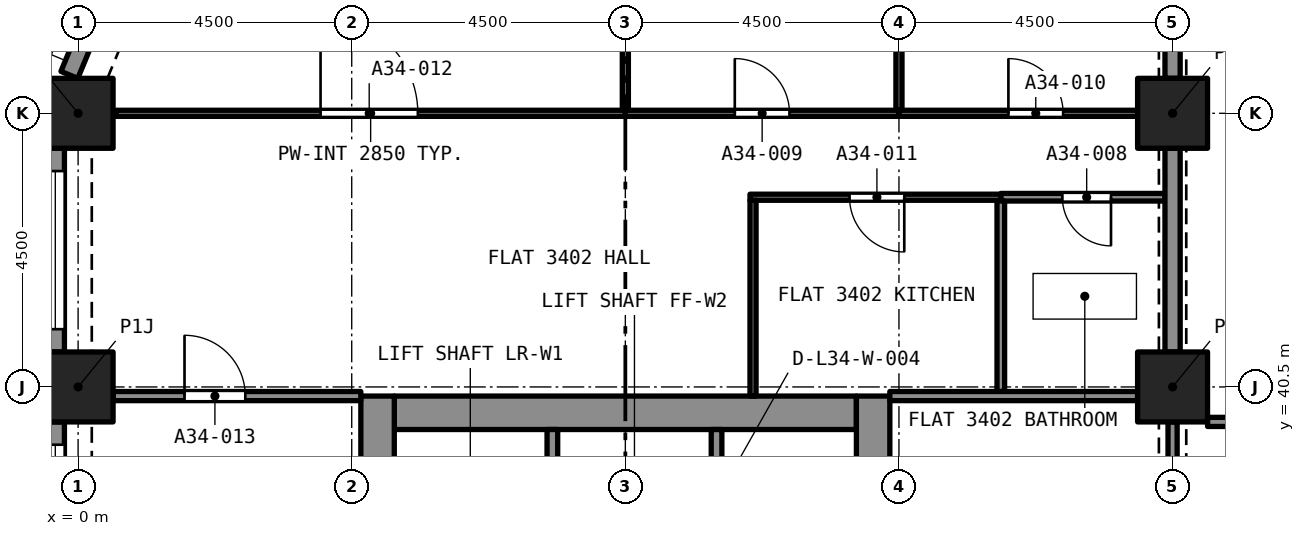
"""IFC4 building model, lengths in metres.
Left out: names, types, materials, properties, quantities, classifications, styles, units other than length and angle.
Written with IfcOpenShell. Run it as: python <this file> out.ifc"""

import sys

from ifc_helpers import new_model, si_unit, direction, frame, frame_2d, origin, origin_2d, place, context, subcontext, project, spatial, rectangle, extrude, element, fill, save


model = new_model("IFC4")
c1 = context("Model", 3, precision=1e-05, world=origin(), true_north=direction((0.0, 1.0)))
c2 = subcontext(c1, "Body", "Model", "MODEL_VIEW")
j1 = project(units=[si_unit("LENGTHUNIT", "METRE"), si_unit("PLANEANGLEUNIT", "RADIAN")], contexts=[c1])
p1 = place(None, origin())
s1 = spatial("IfcSite", under=j1, at=p1, CompositionType="ELEMENT")
p2 = place(p1, origin())
s2 = spatial("IfcBuilding", under=s1, at=p2, CompositionType="ELEMENT")
p3 = place(p2, frame((0.0, 0.0, 121.6)))
s3 = spatial("IfcBuildingStorey", under=s2, at=p3, CompositionType="ELEMENT", Elevation=121.6)
for number, where, z_axis, x_axis in (
    (1, (0.0, 40.5, 0.0), (0.0, 0.0, 1.0), (1.0, 0.0, 0.0)),
    (2, (18.0, 40.5, 0.0), (0.0, 0.0, 1.0), (1.0, 0.0, 0.0)),
    (3, (0.0, 45.0, 0.0), (0.0, 0.0, 1.0), (1.0, 0.0, 0.0)),
    (4, (18.0, 45.0, 0.0), (0.0, 0.0, 1.0), (1.0, 0.0, 0.0)),
):
    element("IfcColumn", number, at=place(p3, frame(where, z_axis=z_axis, x_axis=x_axis)), inside=s3, PredefinedType="COLUMN", context=c2, shape_type="SweptSolid", body=[
        extrude(rectangle(XDim=1.15, YDim=1.15, at=origin_2d()), origin(), (0.0, 0.0, 1.0), 3.2),
    ])
p4 = place(p3, frame((5.2, 40.075, 0.0), z_axis=(0.0, 0.0, 1.0), x_axis=(1.0, 0.0, 0.0)))
e5 = element("IfcWall", 5, at=p4, inside=s3, PredefinedType="SOLIDWALL", context=c2, shape_type="SweptSolid", body=[
    extrude(rectangle(XDim=7.6, YDim=0.55, at=frame_2d((3.8, 0.0))), origin(), (0.0, 0.0, 1.0), 3.2),
])
p5 = place(p3, frame((4.925, 27.15, 0.0), z_axis=(0.0, 0.0, 1.0), x_axis=(0.0, 1.0, 0.0)))
e6 = element("IfcWall", 6, at=p5, inside=s3, PredefinedType="SOLIDWALL", context=c2, shape_type="SweptSolid", body=[
    extrude(rectangle(XDim=13.2, YDim=0.55, at=frame_2d((6.6, 0.0))), origin(), (0.0, 0.0, 1.0), 3.2),
])
p6 = place(p5, frame((8.8, 0.0, 0.0)))
e7 = element("IfcOpeningElement", 7, at=p6, cuts=e6, PredefinedType="OPENING", context=c2, shape_type="SweptSolid", body=[
    extrude(rectangle(XDim=1.2, YDim=2.1, at=frame_2d((0.6, 1.05))), frame((0.0, 0.285, 0.0), z_axis=(0.0, -1.0, 0.0), x_axis=(1.0, 0.0, 0.0)), (0.0, 0.0, 1.0), 0.57),
])
p7 = place(p3, frame((13.075, 27.15, 0.0), z_axis=(0.0, 0.0, 1.0), x_axis=(0.0, 1.0, 0.0)))
e8 = element("IfcWall", 8, at=p7, inside=s3, PredefinedType="SOLIDWALL", context=c2, shape_type="SweptSolid", body=[
    extrude(rectangle(XDim=13.2, YDim=0.55, at=frame_2d((6.6, 0.0))), origin(), (0.0, 0.0, 1.0), 3.2),
])
p8 = place(p7, frame((10.95, 0.0, 0.0)))
e9 = element("IfcOpeningElement", 9, at=p8, cuts=e8, PredefinedType="OPENING", context=c2, shape_type="SweptSolid", body=[
    extrude(rectangle(XDim=1.1, YDim=2.1, at=frame_2d((0.55, 1.05))), frame((0.0, 0.285, 0.0), z_axis=(0.0, -1.0, 0.0), x_axis=(1.0, 0.0, 0.0)), (0.0, 0.0, 1.0), 0.57),
])
p9 = place(p7, frame((8.8, 0.0, 0.0)))
e10 = element("IfcOpeningElement", 10, at=p9, cuts=e8, PredefinedType="OPENING", context=c2, shape_type="SweptSolid", body=[
    extrude(rectangle(XDim=1.2, YDim=2.1, at=frame_2d((0.6, 1.05))), frame((0.0, 0.285, 0.0), z_axis=(0.0, -1.0, 0.0), x_axis=(1.0, 0.0, 0.0)), (0.0, 0.0, 1.0), 0.57),
])
p10 = place(p3, frame((-0.144, 45.632, 0.0), z_axis=(0.0, 0.0, 1.0), x_axis=(0.382723818695, 0.923862802911, 0.0)))
e11 = element("IfcWall", 11, at=p10, inside=s3, PredefinedType="SOLIDWALL", context=c2, shape_type="SweptSolid", body=[
    extrude(rectangle(XDim=2.164, YDim=0.3, at=frame_2d((1.082, 0.0))), origin(), (0.0, 0.0, 1.0), 3.2),
])
p11 = place(p10, frame((0.493, 0.0, 0.45)))
e12 = element("IfcOpeningElement", 12, at=p11, cuts=e11, PredefinedType="OPENING", context=c2, shape_type="SweptSolid", body=[
    extrude(rectangle(XDim=1.4, YDim=1.95, at=frame_2d((0.7, 0.975))), frame((0.0, 0.16, 0.0), z_axis=(0.0, -1.0, 0.0), x_axis=(1.0, 0.0, 0.0)), (0.0, 0.0, 1.0), 0.32),
])
p12 = place(p3, frame((-0.375, 41.075, 0.0), z_axis=(0.0, 0.0, 1.0), x_axis=(0.0, 1.0, 0.0)))
e13 = element("IfcWall", 13, at=p12, inside=s3, PredefinedType="SOLIDWALL", context=c2, shape_type="SweptSolid", body=[
    extrude(rectangle(XDim=3.35, YDim=0.3, at=frame_2d((1.675, 0.0))), origin(), (0.0, 0.0, 1.0), 3.2),
])
p13 = place(p12, frame((0.375, 0.0, 0.45)))
e14 = element("IfcOpeningElement", 14, at=p13, cuts=e13, PredefinedType="OPENING", context=c2, shape_type="SweptSolid", body=[
    extrude(rectangle(XDim=2.6, YDim=1.95, at=frame_2d((1.3, 0.975))), frame((0.0, 0.16, 0.0), z_axis=(0.0, -1.0, 0.0), x_axis=(1.0, 0.0, 0.0)), (0.0, 0.0, 1.0), 0.32),
])
p14 = place(p3, frame((-0.375, 36.575, 0.0), z_axis=(0.0, 0.0, 1.0), x_axis=(0.0, 1.0, 0.0)))
e15 = element("IfcWall", 15, at=p14, inside=s3, PredefinedType="SOLIDWALL", context=c2, shape_type="SweptSolid", body=[
    extrude(rectangle(XDim=3.35, YDim=0.3, at=frame_2d((1.675, 0.0))), origin(), (0.0, 0.0, 1.0), 3.2),
])
p15 = place(p14, frame((0.375, 0.0, 0.45)))
e16 = element("IfcOpeningElement", 16, at=p15, cuts=e15, PredefinedType="OPENING", context=c2, shape_type="SweptSolid", body=[
    extrude(rectangle(XDim=2.6, YDim=1.95, at=frame_2d((1.3, 0.975))), frame((0.0, 0.16, 0.0), z_axis=(0.0, -1.0, 0.0), x_axis=(1.0, 0.0, 0.0)), (0.0, 0.0, 1.0), 0.32),
])
p16 = place(p3, frame((17.875, 43.62, 0.0), z_axis=(0.0, 0.0, 1.0), x_axis=(-1.0, 0.0, 0.0)))
e17 = element("IfcWall", 17, at=p16, inside=s3, PredefinedType="PARTITIONING", context=c2, shape_type="SweptSolid", body=[
    extrude(rectangle(XDim=2.7, YDim=0.125, at=frame_2d((1.35, 0.0))), origin(), (0.0, 0.0, 1.0), 2.85),
])
p17 = place(p16, frame((0.888, 0.0, 0.0)))
e18 = element("IfcOpeningElement", 18, at=p17, cuts=e17, PredefinedType="OPENING", context=c2, shape_type="SweptSolid", body=[
    extrude(rectangle(XDim=0.8, YDim=2.1, at=frame_2d((0.4, 1.05))), frame((0.0, 0.073, 0.0), z_axis=(0.0, -1.0, 0.0), x_axis=(1.0, 0.0, 0.0)), (0.0, 0.0, 1.0), 0.145),
])
p18 = place(p3, frame((15.175, 40.425, 0.0), z_axis=(0.0, 0.0, 1.0), x_axis=(0.0, 1.0, 0.0)))
e19 = element("IfcWall", 19, at=p18, inside=s3, PredefinedType="PARTITIONING", context=c2, shape_type="SweptSolid", body=[
    extrude(rectangle(XDim=3.133, YDim=0.125, at=frame_2d((1.566, 0.0))), origin(), (0.0, 0.0, 1.0), 2.85),
])
p19 = place(p3, frame((18.0, 41.075, 0.0), z_axis=(0.0, 0.0, 1.0), x_axis=(0.0, 1.0, 0.0)))
e20 = element("IfcWall", 20, at=p19, inside=s3, PredefinedType="PARTITIONING", context=c2, shape_type="SweptSolid", body=[
    extrude(rectangle(XDim=3.35, YDim=0.25, at=frame_2d((1.675, 0.0))), origin(), (0.0, 0.0, 1.0), 2.38),
])
p20 = place(p3, frame((13.5, 45.05, 0.0), z_axis=(0.0, 0.0, 1.0), x_axis=(0.0, 1.0, 0.0)))
e21 = element("IfcWall", 21, at=p20, inside=s3, PredefinedType="PARTITIONING", context=c2, shape_type="SweptSolid", body=[
    extrude(rectangle(XDim=3.875, YDim=0.1, at=frame_2d((1.938, 0.0))), origin(), (0.0, 0.0, 1.0), 2.85),
])
p21 = place(p3, frame((9.0, 45.0, 0.0), z_axis=(0.0, 0.0, 1.0), x_axis=(1.0, 0.0, 0.0)))
e22 = element("IfcWall", 22, at=p21, inside=s3, PredefinedType="PARTITIONING", context=c2, shape_type="SweptSolid", body=[
    extrude(rectangle(XDim=4.5, YDim=0.1, at=frame_2d((2.25, 0.0))), origin(), (0.0, 0.0, 1.0), 2.85),
])
p22 = place(p21, frame((1.8, 0.0, 0.0)))
e23 = element("IfcOpeningElement", 23, at=p22, cuts=e22, PredefinedType="OPENING", context=c2, shape_type="SweptSolid", body=[
    extrude(rectangle(XDim=0.9, YDim=2.1, at=frame_2d((0.45, 1.05))), frame((0.0, 0.06, 0.0), z_axis=(0.0, -1.0, 0.0), x_axis=(1.0, 0.0, 0.0)), (0.0, 0.0, 1.0), 0.12),
])
p23 = place(p3, frame((9.0, 45.05, 0.0), z_axis=(0.0, 0.0, 1.0), x_axis=(0.0, 1.0, 0.0)))
e24 = element("IfcWall", 24, at=p23, inside=s3, PredefinedType="PARTITIONING", context=c2, shape_type="SweptSolid", body=[
    extrude(rectangle(XDim=3.875, YDim=0.1, at=frame_2d((1.938, 0.0))), origin(), (0.0, 0.0, 1.0), 2.85),
])
p24 = place(p3, frame((13.5, 45.0, 0.0), z_axis=(0.0, 0.0, 1.0), x_axis=(1.0, 0.0, 0.0)))
e25 = element("IfcWall", 25, at=p24, inside=s3, PredefinedType="PARTITIONING", context=c2, shape_type="SweptSolid", body=[
    extrude(rectangle(XDim=3.925, YDim=0.1, at=frame_2d((1.962, 0.0))), origin(), (0.0, 0.0, 1.0), 2.85),
])
p25 = place(p24, frame((1.8, 0.0, 0.0)))
e26 = element("IfcOpeningElement", 26, at=p25, cuts=e25, PredefinedType="OPENING", context=c2, shape_type="SweptSolid", body=[
    extrude(rectangle(XDim=0.9, YDim=2.1, at=frame_2d((0.45, 1.05))), frame((0.0, 0.06, 0.0), z_axis=(0.0, -1.0, 0.0), x_axis=(1.0, 0.0, 0.0)), (0.0, 0.0, 1.0), 0.12),
])
p26 = place(p3, frame((18.0, 45.575, 0.0), z_axis=(0.0, 0.0, 1.0), x_axis=(0.0, 1.0, 0.0)))
e27 = element("IfcWall", 27, at=p26, inside=s3, PredefinedType="PARTITIONING", context=c2, shape_type="SweptSolid", body=[
    extrude(rectangle(XDim=3.35, YDim=0.25, at=frame_2d((1.675, 0.0))), origin(), (0.0, 0.0, 1.0), 2.38),
])
p27 = place(p3, frame((15.175, 43.62, 0.0), z_axis=(0.0, 0.0, 1.0), x_axis=(-1.0, 0.0, 0.0)))
e28 = element("IfcWall", 28, at=p27, inside=s3, PredefinedType="PARTITIONING", context=c2, shape_type="SweptSolid", body=[
    extrude(rectangle(XDim=4.125, YDim=0.1, at=frame_2d((2.062, 0.0))), origin(), (0.0, 0.0, 1.0), 2.85),
])
p28 = place(p27, frame((1.587, 0.0, 0.0)))
e29 = element("IfcOpeningElement", 29, at=p28, cuts=e28, PredefinedType="OPENING", context=c2, shape_type="SweptSolid", body=[
    extrude(rectangle(XDim=0.9, YDim=2.1, at=frame_2d((0.45, 1.05))), frame((0.0, 0.06, 0.0), z_axis=(0.0, -1.0, 0.0), x_axis=(1.0, 0.0, 0.0)), (0.0, 0.0, 1.0), 0.12),
])
p29 = place(p3, frame((11.1, 40.35, 0.0), z_axis=(0.0, 0.0, 1.0), x_axis=(0.0, 1.0, 0.0)))
e30 = element("IfcWall", 30, at=p29, inside=s3, PredefinedType="PARTITIONING", context=c2, shape_type="SweptSolid", body=[
    extrude(rectangle(XDim=3.22, YDim=0.1, at=frame_2d((1.61, 0.0))), origin(), (0.0, 0.0, 1.0), 2.85),
])
p30 = place(p3, frame((0.622, 45.0, 0.0), z_axis=(0.0, 0.0, 1.0), x_axis=(1.0, 0.0, 0.0)))
e31 = element("IfcWall", 31, at=p30, inside=s3, PredefinedType="PARTITIONING", context=c2, shape_type="SweptSolid", body=[
    extrude(rectangle(XDim=8.378, YDim=0.1, at=frame_2d((4.189, 0.0))), origin(), (0.0, 0.0, 1.0), 2.85),
])
p31 = place(p30, frame((3.365, 0.0, 0.0)))
e32 = element("IfcOpeningElement", 32, at=p31, cuts=e31, PredefinedType="OPENING", context=c2, shape_type="SweptSolid", body=[
    extrude(rectangle(XDim=1.6, YDim=2.1, at=frame_2d((0.8, 1.05))), frame((0.0, 0.06, 0.0), z_axis=(0.0, -1.0, 0.0), x_axis=(1.0, 0.0, 0.0)), (0.0, 0.0, 1.0), 0.12),
])
p32 = place(p3, frame((0.575, 40.35, 0.0), z_axis=(0.0, 0.0, 1.0), x_axis=(1.0, 0.0, 0.0)))
e33 = element("IfcWall", 33, at=p32, inside=s3, PredefinedType="PARTITIONING", context=c2, shape_type="SweptSolid", body=[
    extrude(rectangle(XDim=4.075, YDim=0.15, at=frame_2d((2.038, 0.0))), origin(), (0.0, 0.0, 1.0), 2.85),
])
p33 = place(p32, frame((1.175, 0.0, 0.0)))
e34 = element("IfcOpeningElement", 34, at=p33, cuts=e33, PredefinedType="OPENING", context=c2, shape_type="SweptSolid", body=[
    extrude(rectangle(XDim=1.0, YDim=2.1, at=frame_2d((0.5, 1.05))), frame((0.0, 0.085, 0.0), z_axis=(0.0, -1.0, 0.0), x_axis=(1.0, 0.0, 0.0)), (0.0, 0.0, 1.0), 0.17),
])
p34 = place(p3, frame((13.35, 40.35, 0.0), z_axis=(0.0, 0.0, 1.0), x_axis=(1.0, 0.0, 0.0)))
e35 = element("IfcWall", 35, at=p34, inside=s3, PredefinedType="PARTITIONING", context=c2, shape_type="SweptSolid", body=[
    extrude(rectangle(XDim=4.075, YDim=0.15, at=frame_2d((2.038, 0.0))), origin(), (0.0, 0.0, 1.0), 2.85),
])
p35 = place(p3, frame((18.575, 39.925, 0.0), z_axis=(0.0, 0.0, 1.0), x_axis=(1.0, 0.0, 0.0)))
e36 = element("IfcWall", 36, at=p35, inside=s3, PredefinedType="PARTITIONING", context=c2, shape_type="SweptSolid", body=[
    extrude(rectangle(XDim=8.425, YDim=0.15, at=frame_2d((4.212, 0.0))), origin(), (0.0, 0.0, 1.0), 2.75),
])
p36 = place(p35, frame((3.425, 0.0, 0.0)))
e37 = element("IfcOpeningElement", 37, at=p36, cuts=e36, PredefinedType="OPENING", context=c2, shape_type="SweptSolid", body=[
    extrude(rectangle(XDim=1.0, YDim=2.1, at=frame_2d((0.5, 1.05))), frame((0.0, 0.085, 0.0), z_axis=(0.0, -1.0, 0.0), x_axis=(1.0, 0.0, 0.0)), (0.0, 0.0, 1.0), 0.17),
])
p37 = place(p3, frame((18.0, 39.925, 0.0), z_axis=(0.0, 0.0, 1.0), x_axis=(0.0, -1.0, 0.0)))
e38 = element("IfcWall", 38, at=p37, inside=s3, PredefinedType="PARTITIONING", context=c2, shape_type="SweptSolid", body=[
    extrude(rectangle(XDim=3.35, YDim=0.15, at=frame_2d((1.675, 0.0))), origin(), (0.0, 0.0, 1.0), 2.38),
])
p38 = place(p37, frame((1.075, 0.0, 0.0)))
e39 = element("IfcOpeningElement", 39, at=p38, cuts=e38, PredefinedType="OPENING", context=c2, shape_type="SweptSolid", body=[
    extrude(rectangle(XDim=1.2, YDim=2.1, at=frame_2d((0.6, 1.05))), frame((0.0, 0.085, 0.0), z_axis=(0.0, -1.0, 0.0), x_axis=(1.0, 0.0, 0.0)), (0.0, 0.0, 1.0), 0.17),
])
p39 = place(p3, frame((7.8, 37.5, 0.0), z_axis=(0.0, 0.0, 1.0), x_axis=(0.0, 1.0, 0.0)))
e40 = element("IfcWall", 40, at=p39, inside=s3, PredefinedType="SOLIDWALL", context=c2, shape_type="SweptSolid", body=[
    extrude(rectangle(XDim=2.3, YDim=0.175, at=frame_2d((1.15, 0.0))), origin(), (0.0, 0.0, 1.0), 2.85),
])
p40 = place(p3, frame((10.5, 37.5, 0.0), z_axis=(0.0, 0.0, 1.0), x_axis=(0.0, 1.0, 0.0)))
e41 = element("IfcWall", 41, at=p40, inside=s3, PredefinedType="SOLIDWALL", context=c2, shape_type="SweptSolid", body=[
    extrude(rectangle(XDim=2.3, YDim=0.175, at=frame_2d((1.15, 0.0))), origin(), (0.0, 0.0, 1.0), 2.85),
])
p41 = place(p40, frame((0.65, 0.0, 0.0)))
e42 = element("IfcOpeningElement", 42, at=p41, cuts=e41, PredefinedType="OPENING", context=c2, shape_type="SweptSolid", body=[
    extrude(rectangle(XDim=1.0, YDim=2.1, at=frame_2d((0.5, 1.05))), frame((0.0, 0.097, 0.0), z_axis=(0.0, -1.0, 0.0), x_axis=(1.0, 0.0, 0.0)), (0.0, 0.0, 1.0), 0.195),
])
p42 = place(p13, origin())
e43 = element("IfcWindow", 43, at=p42, inside=s3, PartitioningType="SINGLE_PANEL", PredefinedType="WINDOW", context=c2, shape_type="SweptSolid", body=[
    extrude(rectangle(XDim=2.6, YDim=1.95, at=frame_2d((1.3, 0.975))), frame((0.0, 0.03, 0.0), z_axis=(0.0, -1.0, 0.0), x_axis=(1.0, 0.0, 0.0)), (0.0, 0.0, 1.0), 0.06),
])
fill(e14, e43)
p43 = place(p15, origin())
e44 = element("IfcWindow", 44, at=p43, inside=s3, PartitioningType="SINGLE_PANEL", PredefinedType="WINDOW", context=c2, shape_type="SweptSolid", body=[
    extrude(rectangle(XDim=2.6, YDim=1.95, at=frame_2d((1.3, 0.975))), frame((0.0, 0.03, 0.0), z_axis=(0.0, -1.0, 0.0), x_axis=(1.0, 0.0, 0.0)), (0.0, 0.0, 1.0), 0.06),
])
fill(e16, e44)
p44 = place(p17, origin())
e45 = element("IfcDoor", 45, at=p44, inside=s3, OperationType="SINGLE_SWING_LEFT", PredefinedType="DOOR", context=c2, shape_type="SweptSolid", body=[
    extrude(rectangle(XDim=0.8, YDim=2.1, at=frame_2d((0.4, 1.05))), frame((0.0, 0.025, 0.0), z_axis=(0.0, -1.0, 0.0), x_axis=(1.0, 0.0, 0.0)), (0.0, 0.0, 1.0), 0.05),
])
fill(e18, e45)
p45 = place(p22, origin())
e46 = element("IfcDoor", 46, at=p45, inside=s3, OperationType="SINGLE_SWING_LEFT", PredefinedType="DOOR", context=c2, shape_type="SweptSolid", body=[
    extrude(rectangle(XDim=0.9, YDim=2.1, at=frame_2d((0.45, 1.05))), frame((0.0, 0.025, 0.0), z_axis=(0.0, -1.0, 0.0), x_axis=(1.0, 0.0, 0.0)), (0.0, 0.0, 1.0), 0.05),
])
fill(e23, e46)
p46 = place(p25, origin())
e47 = element("IfcDoor", 47, at=p46, inside=s3, OperationType="SINGLE_SWING_RIGHT", PredefinedType="DOOR", context=c2, shape_type="SweptSolid", body=[
    extrude(rectangle(XDim=0.9, YDim=2.1, at=frame_2d((0.45, 1.05))), frame((0.0, 0.025, 0.0), z_axis=(0.0, -1.0, 0.0), x_axis=(1.0, 0.0, 0.0)), (0.0, 0.0, 1.0), 0.05),
])
fill(e26, e47)
p47 = place(p28, origin())
e48 = element("IfcDoor", 48, at=p47, inside=s3, OperationType="SINGLE_SWING_LEFT", PredefinedType="DOOR", context=c2, shape_type="SweptSolid", body=[
    extrude(rectangle(XDim=0.9, YDim=2.1, at=frame_2d((0.45, 1.05))), frame((0.0, 0.025, 0.0), z_axis=(0.0, -1.0, 0.0), x_axis=(1.0, 0.0, 0.0)), (0.0, 0.0, 1.0), 0.05),
])
fill(e29, e48)
p48 = place(p31, origin())
e49 = element("IfcDoor", 49, at=p48, inside=s3, OperationType="SINGLE_SWING_LEFT", PredefinedType="DOOR", context=c2, shape_type="SweptSolid", body=[
    extrude(rectangle(XDim=1.6, YDim=2.1, at=frame_2d((0.8, 1.05))), frame((0.0, 0.025, 0.0), z_axis=(0.0, -1.0, 0.0), x_axis=(1.0, 0.0, 0.0)), (0.0, 0.0, 1.0), 0.05),
])
fill(e32, e49)
p49 = place(p33, origin())
e50 = element("IfcDoor", 50, at=p49, inside=s3, OperationType="SINGLE_SWING_LEFT", PredefinedType="DOOR", context=c2, shape_type="SweptSolid", body=[
    extrude(rectangle(XDim=1.0, YDim=2.1, at=frame_2d((0.5, 1.05))), frame((0.0, 0.025, 0.0), z_axis=(0.0, -1.0, 0.0), x_axis=(1.0, 0.0, 0.0)), (0.0, 0.0, 1.0), 0.05),
])
fill(e34, e50)
save(model, sys.argv[1])
